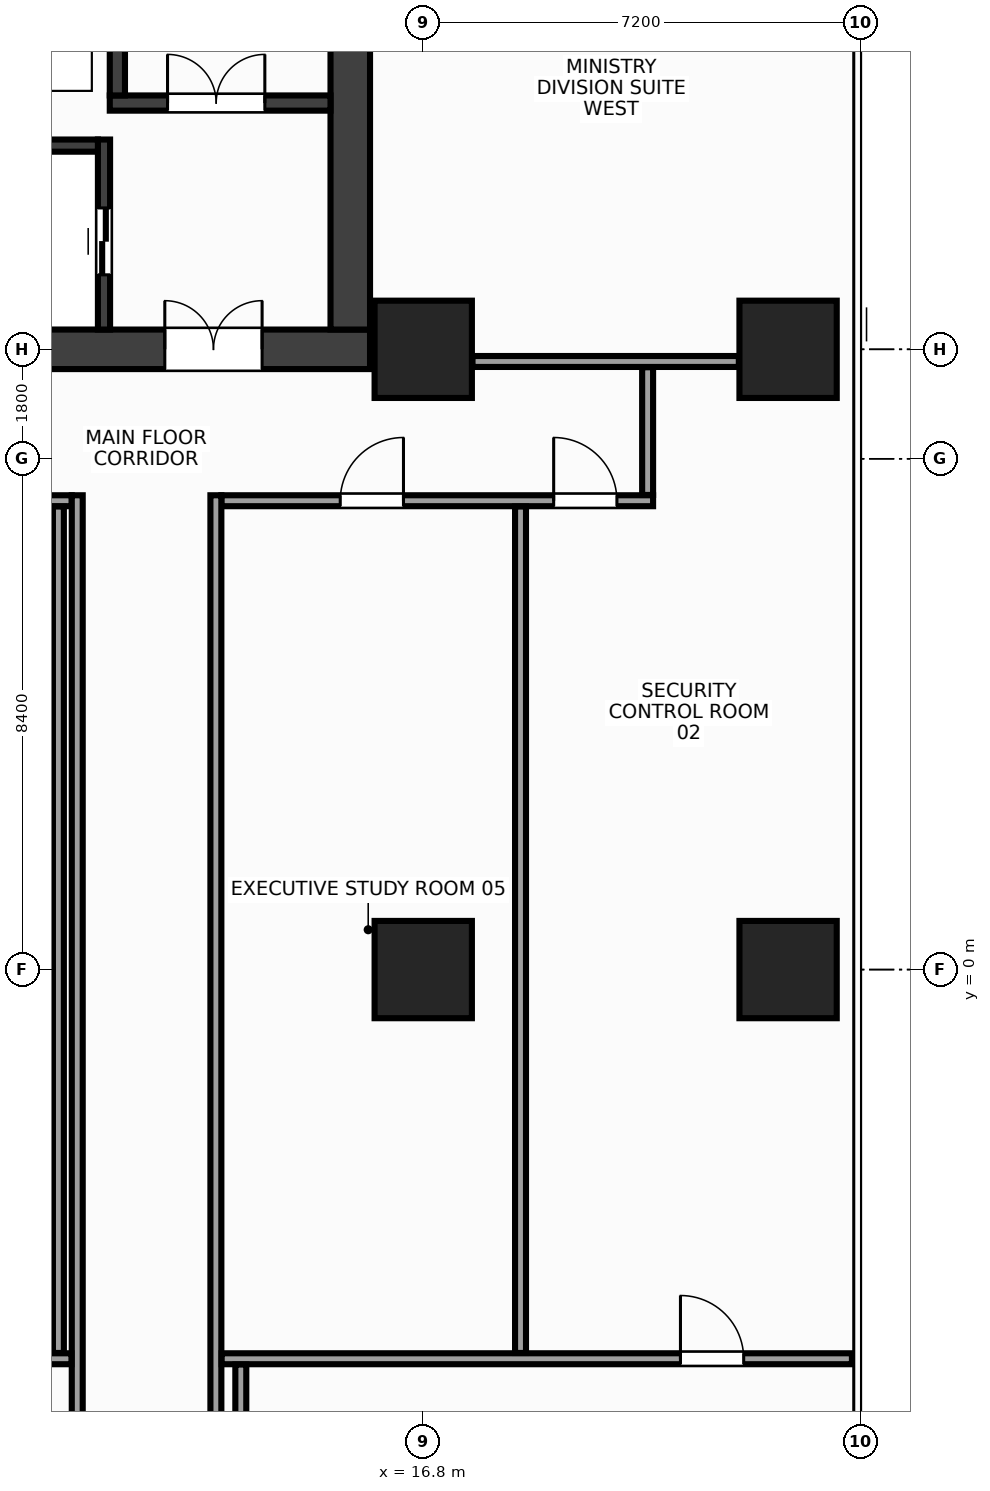
"""IFC4 building model, lengths in metres.
Left out: names, types, materials, properties, quantities, classifications, styles, units other than length and angle.
Written with IfcOpenShell. Run it as: python <this file> out.ifc"""

import sys

from ifc_helpers import new_model, si_unit, direction, frame, frame_2d, origin, origin_2d, place, context, subcontext, project, spatial, rectangle, extrude, source, transform, mapped, element, fill, save


model = new_model("IFC4")
c1 = context("Model", 3, precision=1e-05, world=origin(), true_north=direction((0.0, 1.0)))
c2 = subcontext(c1, "Body", "Model", "MODEL_VIEW")
j1 = project(units=[si_unit("LENGTHUNIT", "METRE"), si_unit("PLANEANGLEUNIT", "RADIAN")], contexts=[c1])
p1 = place(None, origin())
s1 = spatial("IfcSite", under=j1, at=p1, CompositionType="ELEMENT")
p2 = place(p1, origin())
s2 = spatial("IfcBuilding", under=s1, at=p2, CompositionType="ELEMENT")
p3 = place(p2, frame((0.0, 0.0, 174.8)))
s3 = spatial("IfcBuildingStorey", under=s2, at=p3, CompositionType="ELEMENT", Elevation=174.8)
m1 = source(origin(), c2, "Body", "SweptSolid", [
    extrude(rectangle(XDim=31.85, YDim=0.65, at=frame_2d((15.925, 0.0))), origin(), (0.0, 0.0, 1.0), 3.6),
])
p4 = place(p3, frame((-15.925, 10.2, 0.0), z_axis=(0.0, 0.0, 1.0), x_axis=(1.0, 0.0, 0.0)))
e1 = element("IfcWall", 1, at=p4, inside=s3, PredefinedType="SHEAR", context=c2, shape_type="MappedRepresentation", body=[
    mapped(m1, transform((0.0, 0.0, 0.0), x_axis=(1.0, 0.0, 0.0), y_axis=(0.0, 1.0, 0.0), z_axis=(0.0, 0.0, 1.0), scale=1.0)),
])
p5 = place(p4, frame((1.775, 0.0, 0.0)))
e2 = element("IfcOpeningElement", 2, at=p5, cuts=e1, PredefinedType="OPENING", context=c2, shape_type="SweptSolid", body=[
    extrude(rectangle(XDim=1.6, YDim=2.15, at=frame_2d((0.8, 1.075))), frame((0.0, 0.337, 0.0), z_axis=(0.0, -1.0, 0.0), x_axis=(1.0, 0.0, 0.0)), (0.0, 0.0, 1.0), 0.674),
])
p6 = place(p4, frame((28.475, 0.0, 0.0)))
e3 = element("IfcOpeningElement", 3, at=p6, cuts=e1, PredefinedType="OPENING", context=c2, shape_type="SweptSolid", body=[
    extrude(rectangle(XDim=1.6, YDim=2.15, at=frame_2d((0.8, 1.075))), frame((0.0, 0.337, 0.0), z_axis=(0.0, -1.0, 0.0), x_axis=(1.0, 0.0, 0.0)), (0.0, 0.0, 1.0), 0.674),
])
p7 = place(p4, frame((15.175, 0.0, 0.0)))
e4 = element("IfcOpeningElement", 4, at=p7, cuts=e1, PredefinedType="OPENING", context=c2, shape_type="SweptSolid", body=[
    extrude(rectangle(XDim=1.5, YDim=2.2, at=frame_2d((0.75, 1.1))), frame((0.0, 0.337, 0.0), z_axis=(0.0, -1.0, 0.0), x_axis=(1.0, 0.0, 0.0)), (0.0, 0.0, 1.0), 0.674),
])
m2 = source(origin(), c2, "Body", "SweptSolid", [
    extrude(rectangle(XDim=12.95, YDim=0.65, at=frame_2d((6.475, 0.0))), origin(), (0.0, 0.0, 1.0), 3.6),
])
p8 = place(p3, frame((15.6, 10.525, 0.0), z_axis=(0.0, 0.0, 1.0), x_axis=(0.0, 1.0, 0.0)))
e5 = element("IfcWall", 5, at=p8, inside=s3, PredefinedType="SHEAR", context=c2, shape_type="MappedRepresentation", body=[
    mapped(m2, transform((0.0, 0.0, 0.0), x_axis=(1.0, 0.0, 0.0), y_axis=(0.0, 1.0, 0.0), z_axis=(0.0, 0.0, 1.0), scale=1.0)),
])
m3 = source(origin(), c2, "Body", "SweptSolid", [
    extrude(rectangle(XDim=3.63, YDim=0.25, at=frame_2d((1.815, 0.0))), origin(), (0.0, 0.0, 1.0), 3.6),
])
p9 = place(p3, frame((11.645, 14.25, 0.0), z_axis=(0.0, 0.0, 1.0), x_axis=(1.0, 0.0, 0.0)))
e6 = element("IfcWall", 6, at=p9, inside=s3, PredefinedType="SHEAR", context=c2, shape_type="MappedRepresentation", body=[
    mapped(m3, transform((0.0, 0.0, 0.0), x_axis=(1.0, 0.0, 0.0), y_axis=(0.0, 1.0, 0.0), z_axis=(0.0, 0.0, 1.0), scale=1.0)),
])
p10 = place(p9, frame((0.95, 0.0, 0.0)))
e7 = element("IfcOpeningElement", 7, at=p10, cuts=e6, PredefinedType="OPENING", context=c2, shape_type="SweptSolid", body=[
    extrude(rectangle(XDim=1.6, YDim=2.15, at=frame_2d((0.8, 1.075))), frame((0.0, 0.137, 0.0), z_axis=(0.0, -1.0, 0.0), x_axis=(1.0, 0.0, 0.0)), (0.0, 0.0, 1.0), 0.274),
])
m4 = source(origin(), c2, "Body", "SweptSolid", [
    extrude(rectangle(XDim=9.1, YDim=0.25, at=frame_2d((4.55, 0.0))), origin(), (0.0, 0.0, 1.0), 3.6),
])
p11 = place(p3, frame((11.77, 14.375, 0.0), z_axis=(0.0, 0.0, 1.0), x_axis=(0.0, 1.0, 0.0)))
e8 = element("IfcWall", 8, at=p11, inside=s3, PredefinedType="SHEAR", context=c2, shape_type="MappedRepresentation", body=[
    mapped(m4, transform((0.0, 0.0, 0.0), x_axis=(1.0, 0.0, 0.0), y_axis=(0.0, 1.0, 0.0), z_axis=(0.0, 0.0, 1.0), scale=1.0)),
])
m5 = source(origin(), c2, "Body", "SweptSolid", [
    extrude(rectangle(XDim=3.125, YDim=0.2, at=frame_2d((1.562, 0.0))), origin(), (0.0, 0.0, 1.0), 3.6),
])
p12 = place(p3, frame((11.55, 10.525, 0.0), z_axis=(0.0, 0.0, 1.0), x_axis=(0.0, 1.0, 0.0)))
e9 = element("IfcWall", 9, at=p12, inside=s3, PredefinedType="SHEAR", context=c2, shape_type="MappedRepresentation", body=[
    mapped(m5, transform((0.0, 0.0, 0.0), x_axis=(1.0, 0.0, 0.0), y_axis=(0.0, 1.0, 0.0), z_axis=(0.0, 0.0, 1.0), scale=1.0)),
])
p13 = place(p12, frame((0.9, 0.0, 0.0)))
e10 = element("IfcOpeningElement", 10, at=p13, cuts=e9, PredefinedType="OPENING", context=c2, shape_type="SweptSolid", body=[
    extrude(rectangle(XDim=1.1, YDim=2.15, at=frame_2d((0.55, 1.075))), frame((0.0, 0.112, 0.0), z_axis=(0.0, -1.0, 0.0), x_axis=(1.0, 0.0, 0.0)), (0.0, 0.0, 1.0), 0.224),
])
m6 = source(origin(), c2, "Body", "SweptSolid", [
    extrude(rectangle(XDim=2.825, YDim=0.2, at=frame_2d((1.413, 0.0))), origin(), (0.0, 0.0, 1.0), 3.6),
])
p14 = place(p3, frame((8.625, 13.55, 0.0), z_axis=(0.0, 0.0, 1.0), x_axis=(1.0, 0.0, 0.0)))
e11 = element("IfcWall", 11, at=p14, inside=s3, PredefinedType="SHEAR", context=c2, shape_type="MappedRepresentation", body=[
    mapped(m6, transform((0.0, 0.0, 0.0), x_axis=(1.0, 0.0, 0.0), y_axis=(0.0, 1.0, 0.0), z_axis=(0.0, 0.0, 1.0), scale=1.0)),
])
m7 = source(origin(), c2, "Body", "SweptSolid", [
    extrude(rectangle(XDim=1.6, YDim=1.6, at=origin_2d()), origin(), (0.0, 0.0, 1.0), 3.6),
])
for number, where, z_axis, x_axis in (
    (12, (16.8, 0.0, 0.0), (0.0, 0.0, 1.0), (1.0, 0.0, 0.0)),
    (13, (16.8, 10.2, 0.0), (0.0, 0.0, 1.0), (1.0, 0.0, 0.0)),
    (14, (22.8, 0.0, 0.0), (0.0, 0.0, 1.0), (1.0, 0.0, 0.0)),
    (15, (22.8, 10.2, 0.0), (0.0, 0.0, 1.0), (1.0, 0.0, 0.0)),
):
    element("IfcColumn", number, at=place(p3, frame(where, z_axis=z_axis, x_axis=x_axis)), inside=s3, PredefinedType="COLUMN", context=c2, shape_type="MappedRepresentation", body=[
        mapped(m7, transform((0.0, 0.0, 0.0), x_axis=(1.0, 0.0, 0.0), y_axis=(0.0, 1.0, 0.0), z_axis=(0.0, 0.0, 1.0), scale=1.0)),
    ])
m8 = source(origin(), c2, "Body", "SweptSolid", [
    extrude(rectangle(XDim=4.38, YDim=0.18, at=frame_2d((2.19, 0.0))), origin(), (0.0, 0.0, 1.0), 2.915),
])
p15 = place(p3, frame((17.61, 10.0, 0.0), z_axis=(0.0, 0.0, 1.0), x_axis=(1.0, 0.0, 0.0)))
e16 = element("IfcWall", 16, at=p15, inside=s3, PredefinedType="PARTITIONING", context=c2, shape_type="MappedRepresentation", body=[
    mapped(m8, transform((0.0, 0.0, 0.0), x_axis=(1.0, 0.0, 0.0), y_axis=(0.0, 1.0, 0.0), z_axis=(0.0, 0.0, 1.0), scale=1.0)),
])
m9 = source(origin(), c2, "Body", "SweptSolid", [
    extrude(rectangle(XDim=31.6, YDim=0.18, at=frame_2d((15.8, 0.0))), origin(), (0.0, 0.0, 1.0), 2.765),
])
p16 = place(p3, frame((-20.58, 7.71, 0.0), z_axis=(0.0, 0.0, 1.0), x_axis=(1.0, 0.0, 0.0)))
e17 = element("IfcWall", 17, at=p16, inside=s3, PredefinedType="PARTITIONING", context=c2, shape_type="MappedRepresentation", body=[
    mapped(m9, transform((0.0, 0.0, 0.0), x_axis=(1.0, 0.0, 0.0), y_axis=(0.0, 1.0, 0.0), z_axis=(0.0, 0.0, 1.0), scale=1.0)),
])
p17 = place(p16, frame((0.495, 0.0, 0.0)))
e18 = element("IfcOpeningElement", 18, at=p17, cuts=e17, PredefinedType="OPENING", context=c2, shape_type="SweptSolid", body=[
    extrude(rectangle(XDim=1.04, YDim=2.2, at=frame_2d((0.52, 1.1))), frame((0.0, 0.102, 0.0), z_axis=(0.0, -1.0, 0.0), x_axis=(1.0, 0.0, 0.0)), (0.0, 0.0, 1.0), 0.204),
])
p18 = place(p16, frame((5.16, 0.0, 0.0)))
e19 = element("IfcOpeningElement", 19, at=p18, cuts=e17, PredefinedType="OPENING", context=c2, shape_type="SweptSolid", body=[
    extrude(rectangle(XDim=1.04, YDim=2.2, at=frame_2d((0.52, 1.1))), frame((0.0, 0.102, 0.0), z_axis=(0.0, -1.0, 0.0), x_axis=(1.0, 0.0, 0.0)), (0.0, 0.0, 1.0), 0.204),
])
p19 = place(p16, frame((19.86, 0.0, 0.0)))
e20 = element("IfcOpeningElement", 20, at=p19, cuts=e17, PredefinedType="OPENING", context=c2, shape_type="SweptSolid", body=[
    extrude(rectangle(XDim=1.04, YDim=2.2, at=frame_2d((0.52, 1.1))), frame((0.0, 0.102, 0.0), z_axis=(0.0, -1.0, 0.0), x_axis=(1.0, 0.0, 0.0)), (0.0, 0.0, 1.0), 0.204),
])
m10 = source(origin(), c2, "Body", "SweptSolid", [
    extrude(rectangle(XDim=7.1, YDim=0.18, at=frame_2d((3.55, 0.0))), origin(), (0.0, 0.0, 1.0), 2.765),
])
p20 = place(p3, frame((13.48, 7.71, 0.0), z_axis=(0.0, 0.0, 1.0), x_axis=(1.0, 0.0, 0.0)))
e21 = element("IfcWall", 21, at=p20, inside=s3, PredefinedType="PARTITIONING", context=c2, shape_type="MappedRepresentation", body=[
    mapped(m10, transform((0.0, 0.0, 0.0), x_axis=(1.0, 0.0, 0.0), y_axis=(0.0, 1.0, 0.0), z_axis=(0.0, 0.0, 1.0), scale=1.0)),
])
p21 = place(p20, frame((5.465, 0.0, 0.0)))
e22 = element("IfcOpeningElement", 22, at=p21, cuts=e21, PredefinedType="OPENING", context=c2, shape_type="SweptSolid", body=[
    extrude(rectangle(XDim=1.04, YDim=2.2, at=frame_2d((0.52, 1.1))), frame((0.0, 0.102, 0.0), z_axis=(0.0, -1.0, 0.0), x_axis=(1.0, 0.0, 0.0)), (0.0, 0.0, 1.0), 0.204),
])
p22 = place(p20, frame((1.955, 0.0, 0.0)))
e23 = element("IfcOpeningElement", 23, at=p22, cuts=e21, PredefinedType="OPENING", context=c2, shape_type="SweptSolid", body=[
    extrude(rectangle(XDim=1.04, YDim=2.2, at=frame_2d((0.52, 1.1))), frame((0.0, 0.102, 0.0), z_axis=(0.0, -1.0, 0.0), x_axis=(1.0, 0.0, 0.0)), (0.0, 0.0, 1.0), 0.204),
])
m11 = source(origin(), c2, "Body", "SweptSolid", [
    extrude(rectangle(XDim=2.1, YDim=0.18, at=frame_2d((1.05, 0.0))), origin(), (0.0, 0.0, 1.0), 3.38),
])
p23 = place(p3, frame((20.49, 7.805, 0.0), z_axis=(0.0, 0.0, 1.0), x_axis=(0.0, 1.0, 0.0)))
e24 = element("IfcWall", 24, at=p23, inside=s3, PredefinedType="PARTITIONING", context=c2, shape_type="MappedRepresentation", body=[
    mapped(m11, transform((0.0, 0.0, 0.0), x_axis=(1.0, 0.0, 0.0), y_axis=(0.0, 1.0, 0.0), z_axis=(0.0, 0.0, 1.0), scale=1.0)),
])
m12 = source(origin(), c2, "Body", "SweptSolid", [
    extrude(rectangle(XDim=22.595, YDim=0.18, at=frame_2d((11.297, 0.0))), origin(), (0.0, 0.0, 1.0), 2.665),
])
for number, where, z_axis, x_axis in (
    (25, (11.11, -14.795, 0.0), (0.0, 0.0, 1.0), (0.0, 1.0, 0.0)),
    (26, (13.39, -14.795, 0.0), (0.0, 0.0, 1.0), (0.0, 1.0, 0.0)),
):
    element("IfcWall", number, at=place(p3, frame(where, z_axis=z_axis, x_axis=x_axis)), inside=s3, PredefinedType="PARTITIONING", context=c2, shape_type="MappedRepresentation", body=[
        mapped(m12, transform((0.0, 0.0, 0.0), x_axis=(1.0, 0.0, 0.0), y_axis=(0.0, 1.0, 0.0), z_axis=(0.0, 0.0, 1.0), scale=1.0)),
    ])
m13 = source(origin(), c2, "Body", "SweptSolid", [
    extrude(rectangle(XDim=34.865, YDim=0.18, at=frame_2d((17.433, 0.0))), origin(), (0.0, 0.0, 1.0), 2.765),
])
p24 = place(p3, frame((-23.85, -6.4, 0.0), z_axis=(0.0, 0.0, 1.0), x_axis=(1.0, 0.0, 0.0)))
e27 = element("IfcWall", 27, at=p24, inside=s3, PredefinedType="PARTITIONING", context=c2, shape_type="MappedRepresentation", body=[
    mapped(m13, transform((0.0, 0.0, 0.0), x_axis=(1.0, 0.0, 0.0), y_axis=(0.0, 1.0, 0.0), z_axis=(0.0, 0.0, 1.0), scale=1.0)),
])
p25 = place(p24, frame((1.9, 0.0, 0.0)))
e28 = element("IfcOpeningElement", 28, at=p25, cuts=e27, PredefinedType="OPENING", context=c2, shape_type="SweptSolid", body=[
    extrude(rectangle(XDim=1.04, YDim=2.2, at=frame_2d((0.52, 1.1))), frame((0.0, 0.102, 0.0), z_axis=(0.0, -1.0, 0.0), x_axis=(1.0, 0.0, 0.0)), (0.0, 0.0, 1.0), 0.204),
])
p26 = place(p24, frame((9.33, 0.0, 0.0)))
e29 = element("IfcOpeningElement", 29, at=p26, cuts=e27, PredefinedType="OPENING", context=c2, shape_type="SweptSolid", body=[
    extrude(rectangle(XDim=1.04, YDim=2.2, at=frame_2d((0.52, 1.1))), frame((0.0, 0.102, 0.0), z_axis=(0.0, -1.0, 0.0), x_axis=(1.0, 0.0, 0.0)), (0.0, 0.0, 1.0), 0.204),
])
p27 = place(p24, frame((21.33, 0.0, 0.0)))
e30 = element("IfcOpeningElement", 30, at=p27, cuts=e27, PredefinedType="OPENING", context=c2, shape_type="SweptSolid", body=[
    extrude(rectangle(XDim=1.04, YDim=2.2, at=frame_2d((0.52, 1.1))), frame((0.0, 0.102, 0.0), z_axis=(0.0, -1.0, 0.0), x_axis=(1.0, 0.0, 0.0)), (0.0, 0.0, 1.0), 0.204),
])
m14 = source(origin(), c2, "Body", "SweptSolid", [
    extrude(rectangle(XDim=10.365, YDim=0.18, at=frame_2d((5.183, 0.0))), origin(), (0.0, 0.0, 1.0), 2.765),
])
p28 = place(p3, frame((13.485, -6.4, 0.0), z_axis=(0.0, 0.0, 1.0), x_axis=(1.0, 0.0, 0.0)))
e31 = element("IfcWall", 31, at=p28, inside=s3, PredefinedType="PARTITIONING", context=c2, shape_type="MappedRepresentation", body=[
    mapped(m14, transform((0.0, 0.0, 0.0), x_axis=(1.0, 0.0, 0.0), y_axis=(0.0, 1.0, 0.0), z_axis=(0.0, 0.0, 1.0), scale=1.0)),
])
p29 = place(p28, frame((7.545, 0.0, 0.0)))
e32 = element("IfcOpeningElement", 32, at=p29, cuts=e31, PredefinedType="OPENING", context=c2, shape_type="SweptSolid", body=[
    extrude(rectangle(XDim=1.04, YDim=2.2, at=frame_2d((0.52, 1.1))), frame((0.0, 0.102, 0.0), z_axis=(0.0, -1.0, 0.0), x_axis=(1.0, 0.0, 0.0)), (0.0, 0.0, 1.0), 0.204),
])
m15 = source(origin(), c2, "Body", "SweptSolid", [
    extrude(rectangle(XDim=13.92, YDim=0.18, at=frame_2d((6.96, 0.0))), origin(), (0.0, 0.0, 1.0), 2.665),
])
p30 = place(p3, frame((10.8, -6.305, 0.0), z_axis=(0.0, 0.0, 1.0), x_axis=(0.0, 1.0, 0.0)))
e33 = element("IfcWall", 33, at=p30, inside=s3, PredefinedType="PARTITIONING", context=c2, shape_type="MappedRepresentation", body=[
    mapped(m15, transform((0.0, 0.0, 0.0), x_axis=(1.0, 0.0, 0.0), y_axis=(0.0, 1.0, 0.0), z_axis=(0.0, 0.0, 1.0), scale=1.0)),
])
m16 = source(origin(), c2, "Body", "SweptSolid", [
    extrude(rectangle(XDim=13.92, YDim=0.18, at=frame_2d((6.96, 0.0))), origin(), (0.0, 0.0, 1.0), 2.915),
])
p31 = place(p3, frame((18.4, -6.305, 0.0), z_axis=(0.0, 0.0, 1.0), x_axis=(0.0, 1.0, 0.0)))
e34 = element("IfcWall", 34, at=p31, inside=s3, PredefinedType="PARTITIONING", context=c2, shape_type="MappedRepresentation", body=[
    mapped(m16, transform((0.0, 0.0, 0.0), x_axis=(1.0, 0.0, 0.0), y_axis=(0.0, 1.0, 0.0), z_axis=(0.0, 0.0, 1.0), scale=1.0)),
])
m17 = source(origin(), c2, "Body", "SweptSolid", [
    extrude(rectangle(XDim=16.155, YDim=0.18, at=frame_2d((8.077, 0.0))), origin(), (0.0, 0.0, 1.0), 2.915),
])
p32 = place(p3, frame((13.8, -22.65, 0.0), z_axis=(0.0, 0.0, 1.0), x_axis=(0.0, 1.0, 0.0)))
e35 = element("IfcWall", 35, at=p32, inside=s3, PredefinedType="PARTITIONING", context=c2, shape_type="MappedRepresentation", body=[
    mapped(m17, transform((0.0, 0.0, 0.0), x_axis=(1.0, 0.0, 0.0), y_axis=(0.0, 1.0, 0.0), z_axis=(0.0, 0.0, 1.0), scale=1.0)),
])
m18 = source(origin(), c2, "Body", "SweptSolid", [
    extrude(rectangle(XDim=1.6, YDim=2.15, at=frame_2d((0.8, 1.075))), frame((0.0, 0.025, 0.0), z_axis=(0.0, -1.0, 0.0), x_axis=(1.0, 0.0, 0.0)), (0.0, 0.0, 1.0), 0.05),
])
p33 = place(p10, origin())
e36 = element("IfcDoor", 36, at=p33, inside=s3, OperationType="DOUBLE_DOOR_SINGLE_SWING", PredefinedType="DOOR", context=c2, shape_type="MappedRepresentation", body=[
    mapped(m18, transform((0.0, 0.0, 0.0), x_axis=(1.0, 0.0, 0.0), y_axis=(0.0, 1.0, 0.0), z_axis=(0.0, 0.0, 1.0), scale=1.0)),
])
fill(e7, e36)
p34 = place(p6, origin())
e37 = element("IfcDoor", 37, at=p34, inside=s3, OperationType="DOUBLE_DOOR_SINGLE_SWING", PredefinedType="DOOR", context=c2, shape_type="MappedRepresentation", body=[
    mapped(m18, transform((0.0, 0.0, 0.0), x_axis=(1.0, 0.0, 0.0), y_axis=(0.0, 1.0, 0.0), z_axis=(0.0, 0.0, 1.0), scale=1.0)),
])
fill(e3, e37)
m19 = source(origin(), c2, "Body", "SweptSolid", [
    extrude(rectangle(XDim=1.1, YDim=2.15, at=frame_2d((0.55, 1.075))), frame((0.0, 0.025, 0.0), z_axis=(0.0, -1.0, 0.0), x_axis=(1.0, 0.0, 0.0)), (0.0, 0.0, 1.0), 0.05),
])
p35 = place(p13, origin())
e38 = element("IfcDoor", 38, at=p35, inside=s3, OperationType="DOUBLE_DOOR_SLIDING", PredefinedType="DOOR", context=c2, shape_type="MappedRepresentation", body=[
    mapped(m19, transform((0.0, 0.0, 0.0), x_axis=(1.0, 0.0, 0.0), y_axis=(0.0, 1.0, 0.0), z_axis=(0.0, 0.0, 1.0), scale=1.0)),
])
fill(e10, e38)
m20 = source(origin(), c2, "Body", "SweptSolid", [
    extrude(rectangle(XDim=1.04, YDim=2.2, at=frame_2d((0.52, 1.1))), frame((0.0, 0.025, 0.0), z_axis=(0.0, -1.0, 0.0), x_axis=(1.0, 0.0, 0.0)), (0.0, 0.0, 1.0), 0.05),
])
p36 = place(p21, origin())
e39 = element("IfcDoor", 39, at=p36, inside=s3, OperationType="SINGLE_SWING_LEFT", PredefinedType="DOOR", context=c2, shape_type="MappedRepresentation", body=[
    mapped(m20, transform((0.0, 0.0, 0.0), x_axis=(1.0, 0.0, 0.0), y_axis=(0.0, 1.0, 0.0), z_axis=(0.0, 0.0, 1.0), scale=1.0)),
])
fill(e22, e39)
p37 = place(p22, origin())
e40 = element("IfcDoor", 40, at=p37, inside=s3, OperationType="SINGLE_SWING_RIGHT", PredefinedType="DOOR", context=c2, shape_type="MappedRepresentation", body=[
    mapped(m20, transform((0.0, 0.0, 0.0), x_axis=(1.0, 0.0, 0.0), y_axis=(0.0, 1.0, 0.0), z_axis=(0.0, 0.0, 1.0), scale=1.0)),
])
fill(e23, e40)
p38 = place(p29, origin())
e41 = element("IfcDoor", 41, at=p38, inside=s3, OperationType="SINGLE_SWING_LEFT", PredefinedType="DOOR", context=c2, shape_type="MappedRepresentation", body=[
    mapped(m20, transform((0.0, 0.0, 0.0), x_axis=(1.0, 0.0, 0.0), y_axis=(0.0, 1.0, 0.0), z_axis=(0.0, 0.0, 1.0), scale=1.0)),
])
fill(e32, e41)
save(model, sys.argv[1])
